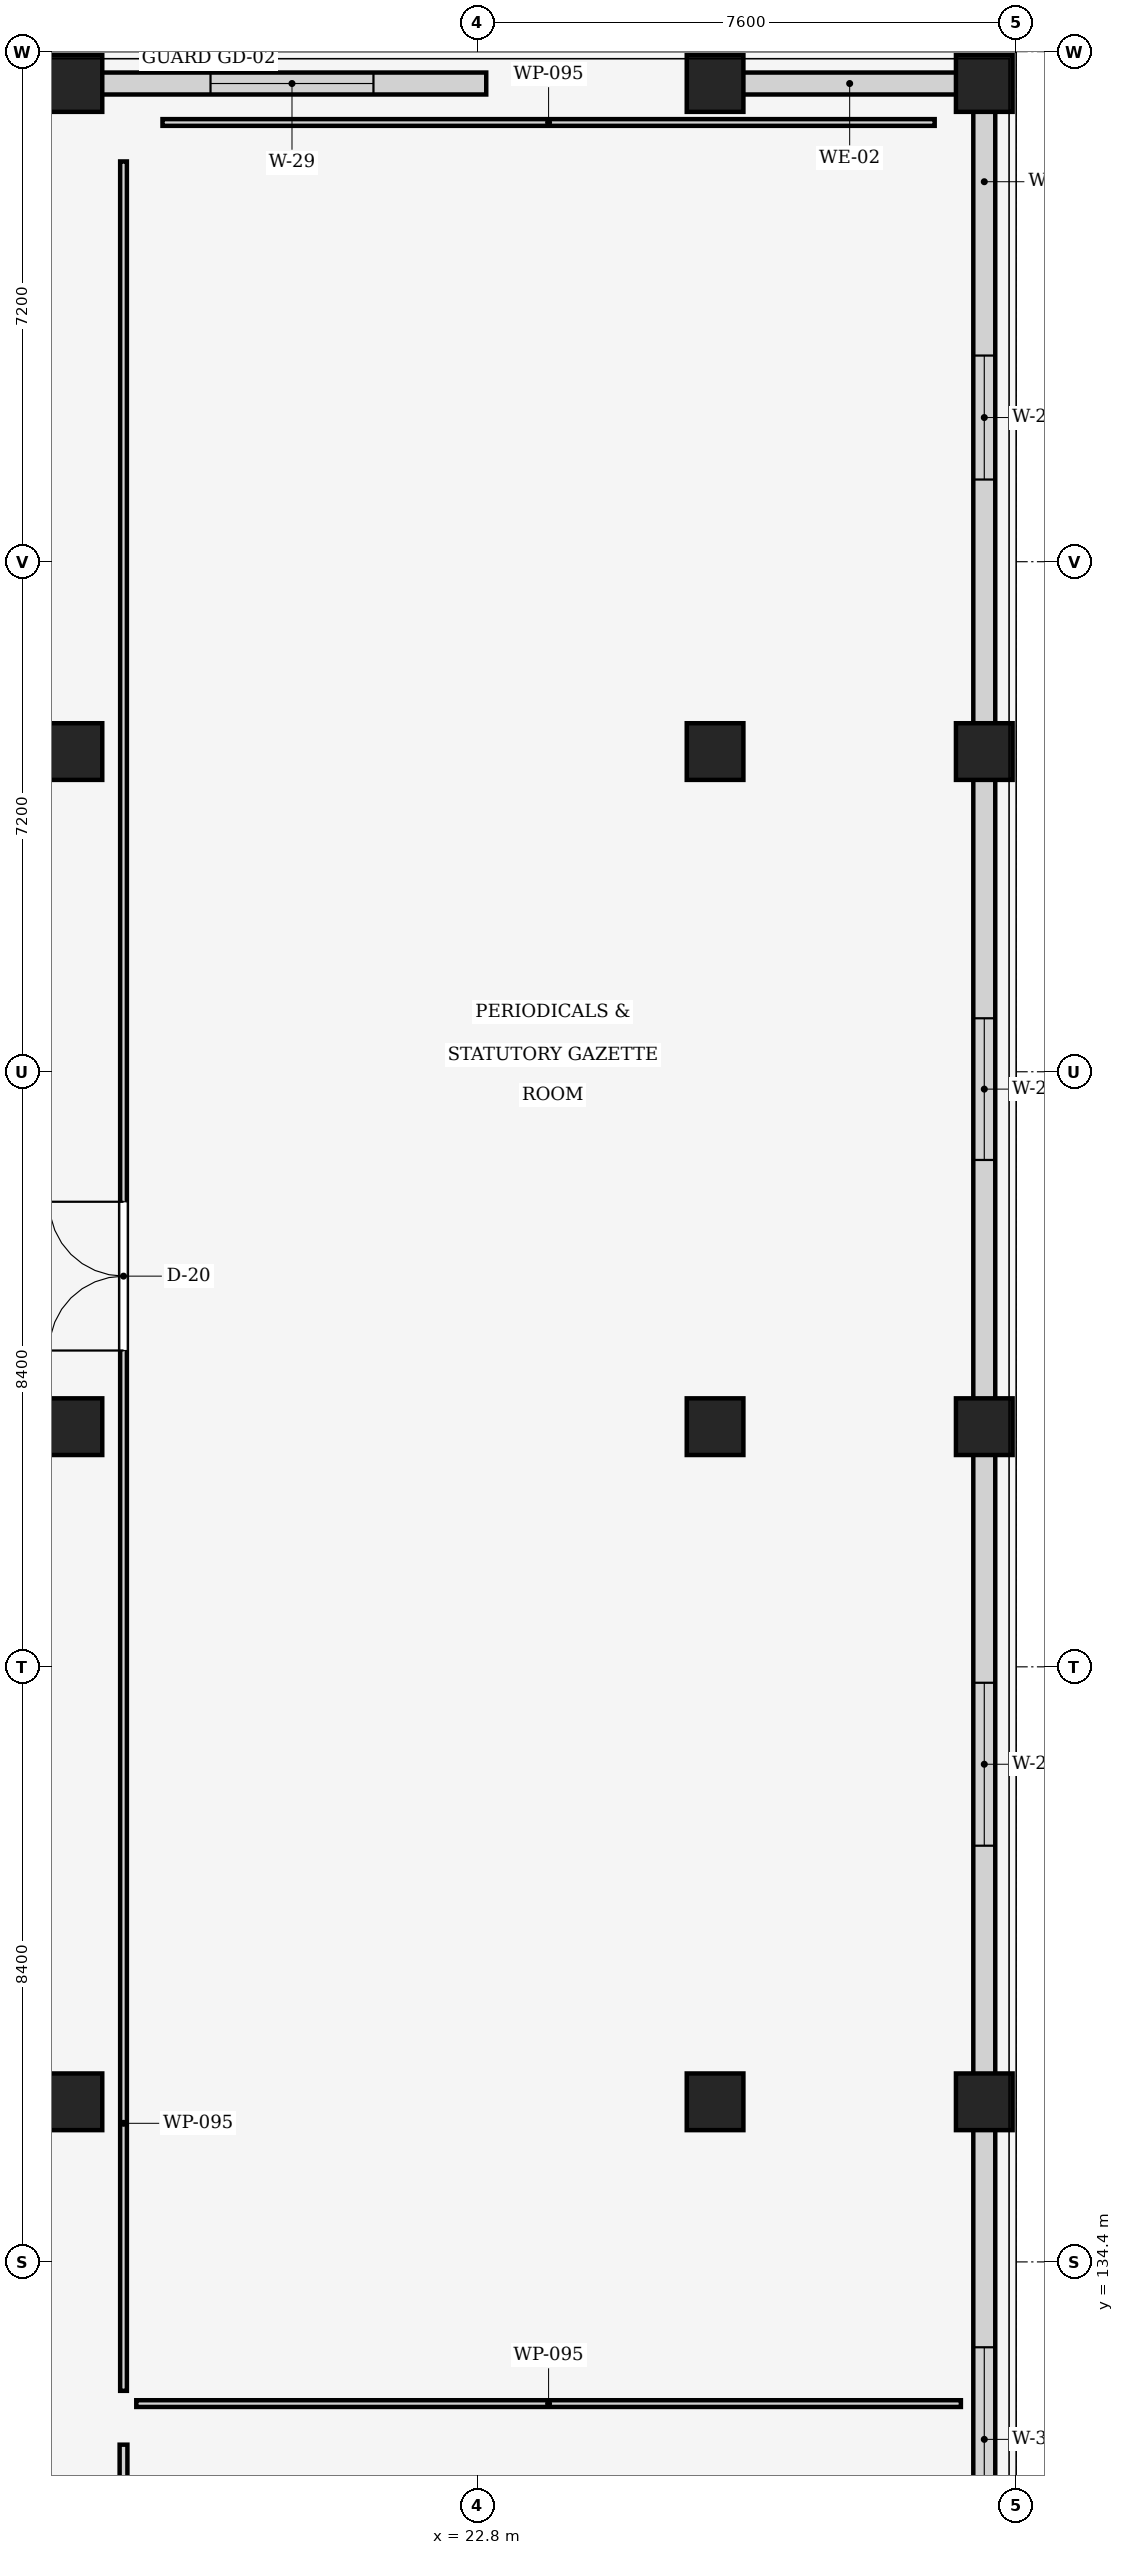
"""IFC4 building model, lengths in metres.
Left out: names, types, materials, properties, quantities, classifications, styles, units other than length and angle.
Written with IfcOpenShell. Run it as: python <this file> out.ifc"""

import sys

from ifc_helpers import new_model, si_unit, direction, frame, frame_2d, origin, origin_2d, place, context, subcontext, project, spatial, rectangle, extrude, element, fill, save


model = new_model("IFC4")
c1 = context("Model", 3, precision=1e-05, world=origin(), true_north=direction((0.0, 1.0)))
c2 = subcontext(c1, "Body", "Model", "MODEL_VIEW")
j1 = project(units=[si_unit("LENGTHUNIT", "METRE"), si_unit("PLANEANGLEUNIT", "RADIAN")], contexts=[c1])
p1 = place(None, origin())
s1 = spatial("IfcSite", under=j1, at=p1, CompositionType="ELEMENT")
p2 = place(p1, origin())
s2 = spatial("IfcBuilding", under=s1, at=p2, CompositionType="ELEMENT")
p3 = place(p2, frame((0.0, 0.0, 5.1)))
s3 = spatial("IfcBuildingStorey", under=s2, at=p3, CompositionType="ELEMENT", Elevation=5.1)
for number, where, z_axis, x_axis in (
    (1, (17.1, 136.66, 0.0), (0.0, 0.0, 1.0), (1.0, 0.0, 0.0)),
    (2, (17.1, 146.19, 0.0), (0.0, 0.0, 1.0), (1.0, 0.0, 0.0)),
    (3, (17.1, 155.72, 0.0), (0.0, 0.0, 1.0), (1.0, 0.0, 0.0)),
    (4, (17.1, 165.15, 0.0), (0.0, 0.0, 1.0), (1.0, 0.0, 0.0)),
    (5, (26.15, 136.66, 0.0), (0.0, 0.0, 1.0), (1.0, 0.0, 0.0)),
    (6, (26.15, 146.19, 0.0), (0.0, 0.0, 1.0), (1.0, 0.0, 0.0)),
    (7, (26.15, 155.72, 0.0), (0.0, 0.0, 1.0), (1.0, 0.0, 0.0)),
    (8, (26.15, 165.15, 0.0), (0.0, 0.0, 1.0), (1.0, 0.0, 0.0)),
    (9, (29.95, 136.66, 0.0), (0.0, 0.0, 1.0), (1.0, 0.0, 0.0)),
    (10, (29.95, 146.19, 0.0), (0.0, 0.0, 1.0), (1.0, 0.0, 0.0)),
    (11, (29.95, 155.72, 0.0), (0.0, 0.0, 1.0), (1.0, 0.0, 0.0)),
    (12, (29.95, 165.15, 0.0), (0.0, 0.0, 1.0), (1.0, 0.0, 0.0)),
):
    element("IfcColumn", number, at=place(p3, frame(where, z_axis=z_axis, x_axis=x_axis)), inside=s3, PredefinedType="COLUMN", context=c2, shape_type="SweptSolid", body=[
        extrude(rectangle(XDim=0.8, YDim=0.8, at=origin_2d()), origin(), (0.0, 0.0, 1.0), 4.05),
    ])
p4 = place(p3, frame((29.95, 164.815, 0.0), z_axis=(0.0, 0.0, 1.0), x_axis=(0.0, -1.0, 0.0)))
e13 = element("IfcWall", 13, at=p4, inside=s3, PredefinedType="STANDARD", context=c2, shape_type="SweptSolid", body=[
    extrude(rectangle(XDim=8.76, YDim=0.31, at=frame_2d((4.38, 0.0))), origin(), (0.0, 0.0, 1.0), 3.145),
])
p5 = place(p4, frame((3.505, 0.0, 0.85)))
e14 = element("IfcOpeningElement", 14, at=p5, cuts=e13, PredefinedType="OPENING", context=c2, shape_type="SweptSolid", body=[
    extrude(rectangle(XDim=1.75, YDim=1.85, at=frame_2d((0.875, 0.925))), frame((0.0, 0.165, 0.0), z_axis=(0.0, -1.0, 0.0), x_axis=(1.0, 0.0, 0.0)), (0.0, 0.0, 1.0), 0.33),
])
p6 = place(p3, frame((29.95, 155.385, 0.0), z_axis=(0.0, 0.0, 1.0), x_axis=(0.0, -1.0, 0.0)))
e15 = element("IfcWall", 15, at=p6, inside=s3, PredefinedType="STANDARD", context=c2, shape_type="SweptSolid", body=[
    extrude(rectangle(XDim=8.86, YDim=0.31, at=frame_2d((4.43, 0.0))), origin(), (0.0, 0.0, 1.0), 3.145),
])
p7 = place(p6, frame((3.43, 0.0, 0.85)))
e16 = element("IfcOpeningElement", 16, at=p7, cuts=e15, PredefinedType="OPENING", context=c2, shape_type="SweptSolid", body=[
    extrude(rectangle(XDim=2.0, YDim=1.85, at=frame_2d((1.0, 0.925))), frame((0.0, 0.165, 0.0), z_axis=(0.0, -1.0, 0.0), x_axis=(1.0, 0.0, 0.0)), (0.0, 0.0, 1.0), 0.33),
])
p8 = place(p3, frame((29.95, 145.855, 0.0), z_axis=(0.0, 0.0, 1.0), x_axis=(0.0, -1.0, 0.0)))
e17 = element("IfcWall", 17, at=p8, inside=s3, PredefinedType="STANDARD", context=c2, shape_type="SweptSolid", body=[
    extrude(rectangle(XDim=8.86, YDim=0.31, at=frame_2d((4.43, 0.0))), origin(), (0.0, 0.0, 1.0), 3.145),
])
p9 = place(p8, frame((3.28, 0.0, 0.85)))
e18 = element("IfcOpeningElement", 18, at=p9, cuts=e17, PredefinedType="OPENING", context=c2, shape_type="SweptSolid", body=[
    extrude(rectangle(XDim=2.3, YDim=1.85, at=frame_2d((1.15, 0.925))), frame((0.0, 0.165, 0.0), z_axis=(0.0, -1.0, 0.0), x_axis=(1.0, 0.0, 0.0)), (0.0, 0.0, 1.0), 0.33),
])
p10 = place(p3, frame((29.95, 136.325, 0.0), z_axis=(0.0, 0.0, 1.0), x_axis=(0.0, -1.0, 0.0)))
e19 = element("IfcWall", 19, at=p10, inside=s3, PredefinedType="STANDARD", context=c2, shape_type="SweptSolid", body=[
    extrude(rectangle(XDim=8.86, YDim=0.31, at=frame_2d((4.43, 0.0))), origin(), (0.0, 0.0, 1.0), 3.145),
])
p11 = place(p10, frame((3.13, 0.0, 0.85)))
e20 = element("IfcOpeningElement", 20, at=p11, cuts=e19, PredefinedType="OPENING", context=c2, shape_type="SweptSolid", body=[
    extrude(rectangle(XDim=2.6, YDim=1.85, at=frame_2d((1.3, 0.925))), frame((0.0, 0.165, 0.0), z_axis=(0.0, -1.0, 0.0), x_axis=(1.0, 0.0, 0.0)), (0.0, 0.0, 1.0), 0.33),
])
p12 = place(p3, frame((17.435, 165.15, 0.0), z_axis=(0.0, 0.0, 1.0), x_axis=(1.0, 0.0, 0.0)))
e21 = element("IfcWall", 21, at=p12, inside=s3, PredefinedType="STANDARD", context=c2, shape_type="SweptSolid", body=[
    extrude(rectangle(XDim=5.485, YDim=0.31, at=frame_2d((2.742, 0.0))), origin(), (0.0, 0.0, 1.0), 2.995),
])
p13 = place(p12, frame((1.593, 0.0, 0.85)))
e22 = element("IfcOpeningElement", 22, at=p13, cuts=e21, PredefinedType="OPENING", context=c2, shape_type="SweptSolid", body=[
    extrude(rectangle(XDim=2.3, YDim=1.85, at=frame_2d((1.15, 0.925))), frame((0.0, 0.165, 0.0), z_axis=(0.0, -1.0, 0.0), x_axis=(1.0, 0.0, 0.0)), (0.0, 0.0, 1.0), 0.33),
])
p14 = place(p3, frame((26.485, 165.15, 0.0), z_axis=(0.0, 0.0, 1.0), x_axis=(1.0, 0.0, 0.0)))
e23 = element("IfcWall", 23, at=p14, inside=s3, PredefinedType="STANDARD", context=c2, shape_type="SweptSolid", body=[
    extrude(rectangle(XDim=3.13, YDim=0.31, at=frame_2d((1.565, 0.0))), origin(), (0.0, 0.0, 1.0), 2.995),
])
p15 = place(p3, frame((17.8, 102.15, 0.0), z_axis=(0.0, 0.0, 1.0), x_axis=(0.0, 1.0, 0.0)))
e24 = element("IfcWall", 24, at=p15, inside=s3, PredefinedType="PARTITIONING", context=c2, shape_type="SweptSolid", body=[
    extrude(rectangle(XDim=29.67, YDim=0.11, at=frame_2d((14.835, 0.0))), origin(), (0.0, 0.0, 1.0), 2.995),
])
p16 = place(p15, frame((13.135, 0.0, 0.0)))
e25 = element("IfcOpeningElement", 25, at=p16, cuts=e24, PredefinedType="OPENING", context=c2, shape_type="SweptSolid", body=[
    extrude(rectangle(XDim=1.7, YDim=2.35, at=frame_2d((0.85, 1.175))), frame((0.0, 0.065, 0.0), z_axis=(0.0, -1.0, 0.0), x_axis=(1.0, 0.0, 0.0)), (0.0, 0.0, 1.0), 0.13),
])
p17 = place(p3, frame((17.8, 132.58, 0.0), z_axis=(0.0, 0.0, 1.0), x_axis=(0.0, 1.0, 0.0)))
e26 = element("IfcWall", 26, at=p17, inside=s3, PredefinedType="PARTITIONING", context=c2, shape_type="SweptSolid", body=[
    extrude(rectangle(XDim=31.47, YDim=0.095, at=frame_2d((15.735, 0.0))), origin(), (0.0, 0.0, 1.0), 2.995),
])
p18 = place(p17, frame((14.685, 0.0, 0.0)))
e27 = element("IfcOpeningElement", 27, at=p18, cuts=e26, PredefinedType="OPENING", context=c2, shape_type="SweptSolid", body=[
    extrude(rectangle(XDim=2.1, YDim=2.35, at=frame_2d((1.05, 1.175))), frame((0.0, 0.057, 0.0), z_axis=(0.0, -1.0, 0.0), x_axis=(1.0, 0.0, 0.0)), (0.0, 0.0, 1.0), 0.115),
])
p19 = place(p3, frame((29.62, 132.4, 0.0), z_axis=(0.0, 0.0, 1.0), x_axis=(-1.0, 0.0, 0.0)))
e28 = element("IfcWall", 28, at=p19, inside=s3, PredefinedType="PARTITIONING", context=c2, shape_type="SweptSolid", body=[
    extrude(rectangle(XDim=11.64, YDim=0.095, at=frame_2d((5.82, 0.0))), origin(), (0.0, 0.0, 1.0), 3.145),
])
p20 = place(p3, frame((18.35, 164.6, 0.0), z_axis=(0.0, 0.0, 1.0), x_axis=(1.0, 0.0, 0.0)))
e29 = element("IfcWall", 29, at=p20, inside=s3, PredefinedType="PARTITIONING", context=c2, shape_type="SweptSolid", body=[
    extrude(rectangle(XDim=10.9, YDim=0.095, at=frame_2d((5.45, 0.0))), origin(), (0.0, 0.0, 1.0), 3.145),
])
p21 = place(p5, origin())
e30 = element("IfcWindow", 30, at=p21, inside=s3, PartitioningType="SINGLE_PANEL", PredefinedType="WINDOW", context=c2, shape_type="SweptSolid", body=[
    extrude(rectangle(XDim=1.75, YDim=1.85, at=frame_2d((0.875, 0.925))), frame((0.0, 0.03, 0.0), z_axis=(0.0, -1.0, 0.0), x_axis=(1.0, 0.0, 0.0)), (0.0, 0.0, 1.0), 0.06),
])
fill(e14, e30)
p22 = place(p7, origin())
e31 = element("IfcWindow", 31, at=p22, inside=s3, PartitioningType="SINGLE_PANEL", PredefinedType="WINDOW", context=c2, shape_type="SweptSolid", body=[
    extrude(rectangle(XDim=2.0, YDim=1.85, at=frame_2d((1.0, 0.925))), frame((0.0, 0.03, 0.0), z_axis=(0.0, -1.0, 0.0), x_axis=(1.0, 0.0, 0.0)), (0.0, 0.0, 1.0), 0.06),
])
fill(e16, e31)
p23 = place(p9, origin())
e32 = element("IfcWindow", 32, at=p23, inside=s3, PartitioningType="SINGLE_PANEL", PredefinedType="WINDOW", context=c2, shape_type="SweptSolid", body=[
    extrude(rectangle(XDim=2.3, YDim=1.85, at=frame_2d((1.15, 0.925))), frame((0.0, 0.03, 0.0), z_axis=(0.0, -1.0, 0.0), x_axis=(1.0, 0.0, 0.0)), (0.0, 0.0, 1.0), 0.06),
])
fill(e18, e32)
p24 = place(p11, origin())
e33 = element("IfcWindow", 33, at=p24, inside=s3, PartitioningType="SINGLE_PANEL", PredefinedType="WINDOW", context=c2, shape_type="SweptSolid", body=[
    extrude(rectangle(XDim=2.6, YDim=1.85, at=frame_2d((1.3, 0.925))), frame((0.0, 0.03, 0.0), z_axis=(0.0, -1.0, 0.0), x_axis=(1.0, 0.0, 0.0)), (0.0, 0.0, 1.0), 0.06),
])
fill(e20, e33)
p25 = place(p13, origin())
e34 = element("IfcWindow", 34, at=p25, inside=s3, PartitioningType="SINGLE_PANEL", PredefinedType="WINDOW", context=c2, shape_type="SweptSolid", body=[
    extrude(rectangle(XDim=2.3, YDim=1.85, at=frame_2d((1.15, 0.925))), frame((0.0, 0.03, 0.0), z_axis=(0.0, -1.0, 0.0), x_axis=(1.0, 0.0, 0.0)), (0.0, 0.0, 1.0), 0.06),
])
fill(e22, e34)
p26 = place(p18, origin())
e35 = element("IfcDoor", 35, at=p26, inside=s3, OperationType="DOUBLE_DOOR_SINGLE_SWING", PredefinedType="DOOR", context=c2, shape_type="SweptSolid", body=[
    extrude(rectangle(XDim=2.1, YDim=2.35, at=frame_2d((1.05, 1.175))), frame((0.0, 0.025, 0.0), z_axis=(0.0, -1.0, 0.0), x_axis=(1.0, 0.0, 0.0)), (0.0, 0.0, 1.0), 0.05),
])
fill(e27, e35)
save(model, sys.argv[1])
